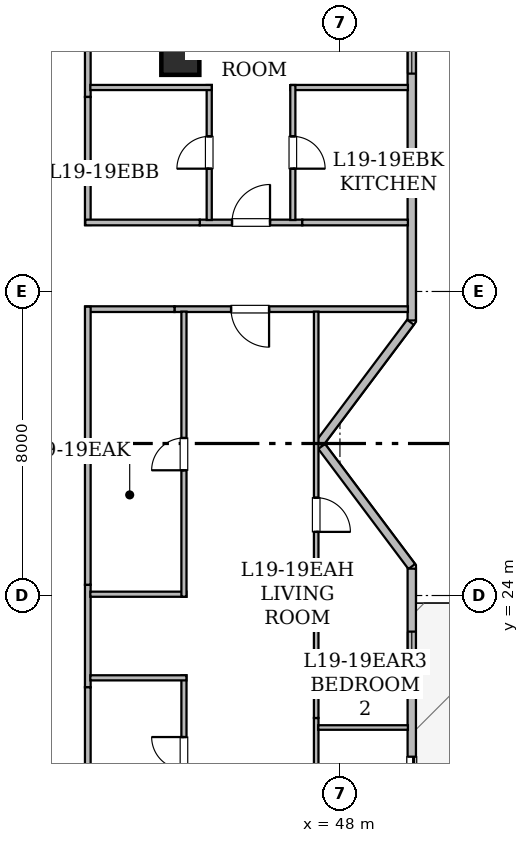
"""IFC4 building model, lengths in metres.
Left out: names, types, materials, properties, quantities, classifications, styles, units other than length and angle.
Written with IfcOpenShell. Run it as: python <this file> out.ifc"""

import sys

from ifc_helpers import new_model, si_unit, direction, frame, frame_2d, origin, origin_2d, place, context, subcontext, project, spatial, rectangle, hollow_rectangle, extrude, element, fill, save


model = new_model("IFC4")
c1 = context("Model", 3, precision=1e-05, world=origin(), true_north=direction((0.0, 1.0)))
c2 = subcontext(c1, "Body", "Model", "MODEL_VIEW")
j1 = project(units=[si_unit("LENGTHUNIT", "METRE"), si_unit("PLANEANGLEUNIT", "RADIAN")], contexts=[c1])
p1 = place(None, origin())
s1 = spatial("IfcSite", under=j1, at=p1, CompositionType="ELEMENT")
p2 = place(p1, origin())
s2 = spatial("IfcBuilding", under=s1, at=p2, CompositionType="ELEMENT")
p3 = place(p2, frame((0.0, 0.0, 77.1)))
s3 = spatial("IfcBuildingStorey", under=s2, at=p3, CompositionType="ELEMENT", Elevation=77.1)
p4 = place(p3, frame((43.8, 38.2, 0.0), z_axis=(0.0, 0.0, 1.0), x_axis=(1.0, 0.0, 0.0)))
e1 = element("IfcColumn", 1, at=p4, inside=s3, PredefinedType="COLUMN", context=c2, shape_type="SweptSolid", body=[
    extrude(hollow_rectangle(XDim=1.0, YDim=1.0, WallThickness=0.05, at=origin_2d()), origin(), (0.0, 0.0, 1.0), 3.65),
])
p5 = place(p3, frame((49.89, 48.683, 0.0), z_axis=(0.0, 0.0, 1.0), x_axis=(0.0, -1.0, 0.0)))
e2 = element("IfcWall", 2, at=p5, inside=s3, PredefinedType="STANDARD", context=c2, shape_type="SweptSolid", body=[
    extrude(rectangle(XDim=17.446, YDim=0.22, at=frame_2d((8.723, 0.0))), origin(), (0.0, 0.0, 1.0), 3.43),
])
p6 = place(p5, frame((9.301, 0.0, 0.85)))
e3 = element("IfcOpeningElement", 3, at=p6, cuts=e2, PredefinedType="OPENING", context=c2, shape_type="SweptSolid", body=[
    extrude(rectangle(XDim=1.65, YDim=1.55, at=frame_2d((0.825, 0.775))), frame((0.0, 0.12, 0.0), z_axis=(0.0, -1.0, 0.0), x_axis=(1.0, 0.0, 0.0)), (0.0, 0.0, 1.0), 0.24),
])
p7 = place(p5, frame((4.036, 0.0, 0.85)))
e4 = element("IfcOpeningElement", 4, at=p7, cuts=e2, PredefinedType="OPENING", context=c2, shape_type="SweptSolid", body=[
    extrude(rectangle(XDim=1.65, YDim=1.55, at=frame_2d((0.825, 0.775))), frame((0.0, 0.12, 0.0), z_axis=(0.0, -1.0, 0.0), x_axis=(1.0, 0.0, 0.0)), (0.0, 0.0, 1.0), 0.24),
])
p8 = place(p3, frame((49.856, 31.191, 0.0), z_axis=(0.0, 0.0, 1.0), x_axis=(-0.600137081448, -0.799897170561, 0.0)))
e5 = element("IfcWall", 5, at=p8, inside=s3, PredefinedType="STANDARD", context=c2, shape_type="SweptSolid", body=[
    extrude(rectangle(XDim=3.989, YDim=0.22, at=frame_2d((1.995, 0.0))), origin(), (0.0, 0.0, 1.0), 3.43),
])
p9 = place(p3, frame((47.519, 27.923, 0.0), z_axis=(0.0, 0.0, 1.0), x_axis=(0.600118645218, -0.799911002338, 0.0)))
e6 = element("IfcWall", 6, at=p9, inside=s3, PredefinedType="STANDARD", context=c2, shape_type="SweptSolid", body=[
    extrude(rectangle(XDim=3.951, YDim=0.22, at=frame_2d((1.975, 0.0))), origin(), (0.0, 0.0, 1.0), 3.43),
])
p10 = place(p3, frame((49.89, 24.707, 0.0), z_axis=(0.0, 0.0, 1.0), x_axis=(0.0, -1.0, 0.0)))
e7 = element("IfcWall", 7, at=p10, inside=s3, PredefinedType="STANDARD", context=c2, shape_type="SweptSolid", body=[
    extrude(rectangle(XDim=17.461, YDim=0.22, at=frame_2d((8.73, 0.0))), origin(), (0.0, 0.0, 1.0), 3.43),
])
p11 = place(p10, frame((4.948, 0.0, 0.0)))
e8 = element("IfcOpeningElement", 8, at=p11, cuts=e7, PredefinedType="OPENING", context=c2, shape_type="SweptSolid", body=[
    extrude(rectangle(XDim=1.1, YDim=2.2, at=frame_2d((0.55, 1.1))), frame((0.0, 0.12, 0.0), z_axis=(0.0, -1.0, 0.0), x_axis=(1.0, 0.0, 0.0)), (0.0, 0.0, 1.0), 0.24),
])
p12 = place(p10, frame((14.329, 0.0, 0.85)))
e9 = element("IfcOpeningElement", 9, at=p12, cuts=e7, PredefinedType="OPENING", context=c2, shape_type="SweptSolid", body=[
    extrude(rectangle(XDim=1.65, YDim=1.55, at=frame_2d((0.825, 0.775))), frame((0.0, 0.12, 0.0), z_axis=(0.0, -1.0, 0.0), x_axis=(1.0, 0.0, 0.0)), (0.0, 0.0, 1.0), 0.24),
])
p13 = place(p10, frame((1.657, 0.0, 0.85)))
e10 = element("IfcOpeningElement", 10, at=p13, cuts=e7, PredefinedType="OPENING", context=c2, shape_type="SweptSolid", body=[
    extrude(rectangle(XDim=1.65, YDim=1.55, at=frame_2d((0.825, 0.775))), frame((0.0, 0.12, 0.0), z_axis=(0.0, -1.0, 0.0), x_axis=(1.0, 0.0, 0.0)), (0.0, 0.0, 1.0), 0.24),
])
p14 = place(p3, frame((49.788, 31.535, 0.0), z_axis=(0.0, 0.0, 1.0), x_axis=(-1.0, 0.0, 0.0)))
e11 = element("IfcWall", 11, at=p14, inside=s3, PredefinedType="STANDARD", context=c2, shape_type="SweptSolid", body=[
    extrude(rectangle(XDim=6.142, YDim=0.15, at=frame_2d((3.071, 0.0))), origin(), (0.0, 0.0, 1.0), 2.647),
])
p15 = place(p14, frame((3.653, 0.0, 0.0)))
e12 = element("IfcOpeningElement", 12, at=p15, cuts=e11, PredefinedType="OPENING", context=c2, shape_type="SweptSolid", body=[
    extrude(rectangle(XDim=1.0, YDim=2.15, at=frame_2d((0.5, 1.075))), frame((0.0, 0.085, 0.0), z_axis=(0.0, -1.0, 0.0), x_axis=(1.0, 0.0, 0.0)), (0.0, 0.0, 1.0), 0.17),
])
p16 = place(p3, frame((41.365, 24.283, 0.0), z_axis=(0.0, 0.0, 1.0), x_axis=(0.0, -1.0, 0.0)))
e13 = element("IfcWall", 13, at=p16, inside=s3, PredefinedType="STANDARD", context=c2, shape_type="SweptSolid", body=[
    extrude(rectangle(XDim=2.698, YDim=0.15, at=frame_2d((1.349, 0.0))), origin(), (0.0, 0.0, 1.0), 3.43),
])
p17 = place(p3, frame((41.365, 21.585, 0.0), z_axis=(0.0, 0.0, 1.0), x_axis=(0.0, -1.0, 0.0)))
e14 = element("IfcWall", 14, at=p17, inside=s3, PredefinedType="STANDARD", context=c2, shape_type="SweptSolid", body=[
    extrude(rectangle(XDim=3.467, YDim=0.15, at=frame_2d((1.733, 0.0))), origin(), (0.0, 0.0, 1.0), 2.647),
])
p18 = place(p3, frame((43.646, 31.535, 0.0), z_axis=(0.0, 0.0, 1.0), x_axis=(-1.0, 0.0, 0.0)))
e15 = element("IfcWall", 15, at=p18, inside=s3, PredefinedType="STANDARD", context=c2, shape_type="SweptSolid", body=[
    extrude(rectangle(XDim=2.346, YDim=0.15, at=frame_2d((1.173, 0.0))), origin(), (0.0, 0.0, 1.0), 2.647),
])
p19 = place(p3, frame((41.365, 31.6, 0.0), z_axis=(0.0, 0.0, 1.0), x_axis=(0.0, -1.0, 0.0)))
e16 = element("IfcWall", 16, at=p19, inside=s3, PredefinedType="STANDARD", context=c2, shape_type="SweptSolid", body=[
    extrude(rectangle(XDim=7.317, YDim=0.15, at=frame_2d((3.659, 0.0))), origin(), (0.0, 0.0, 1.0), 2.961),
])
p20 = place(p3, frame((41.365, 39.1, 0.0), z_axis=(0.0, 0.0, 1.0), x_axis=(0.0, -1.0, 0.0)))
e17 = element("IfcWall", 17, at=p20, inside=s3, PredefinedType="STANDARD", context=c2, shape_type="SweptSolid", body=[
    extrude(rectangle(XDim=1.982, YDim=0.15, at=frame_2d((0.991, 0.0))), origin(), (0.0, 0.0, 1.0), 2.647),
])
p21 = place(p3, frame((44.311, 33.815, 0.0), z_axis=(0.0, 0.0, 1.0), x_axis=(1.0, 0.0, 0.0)))
e18 = element("IfcWall", 18, at=p21, inside=s3, PredefinedType="STANDARD", context=c2, shape_type="SweptSolid", body=[
    extrude(rectangle(XDim=2.698, YDim=0.15, at=frame_2d((1.349, 0.0))), origin(), (0.0, 0.0, 1.0), 3.43),
])
p22 = place(p21, frame((0.849, 0.0, 0.0)))
e19 = element("IfcOpeningElement", 19, at=p22, cuts=e18, PredefinedType="OPENING", context=c2, shape_type="SweptSolid", body=[
    extrude(rectangle(XDim=1.0, YDim=2.15, at=frame_2d((0.5, 1.075))), frame((0.0, 0.085, 0.0), z_axis=(0.0, -1.0, 0.0), x_axis=(1.0, 0.0, 0.0)), (0.0, 0.0, 1.0), 0.17),
])
p23 = place(p3, frame((41.365, 37.118, 0.0), z_axis=(0.0, 0.0, 1.0), x_axis=(0.0, -1.0, 0.0)))
e20 = element("IfcWall", 20, at=p23, inside=s3, PredefinedType="STANDARD", context=c2, shape_type="SweptSolid", body=[
    extrude(rectangle(XDim=3.368, YDim=0.15, at=frame_2d((1.684, 0.0))), origin(), (0.0, 0.0, 1.0), 3.43),
])
p24 = place(p3, frame((41.3, 33.815, 0.0), z_axis=(0.0, 0.0, 1.0), x_axis=(1.0, 0.0, 0.0)))
e21 = element("IfcWall", 21, at=p24, inside=s3, PredefinedType="STANDARD", context=c2, shape_type="SweptSolid", body=[
    extrude(rectangle(XDim=3.011, YDim=0.15, at=frame_2d((1.505, 0.0))), origin(), (0.0, 0.0, 1.0), 2.647),
])
p25 = place(p3, frame((47.009, 33.815, 0.0), z_axis=(0.0, 0.0, 1.0), x_axis=(1.0, 0.0, 0.0)))
e22 = element("IfcWall", 22, at=p25, inside=s3, PredefinedType="STANDARD", context=c2, shape_type="SweptSolid", body=[
    extrude(rectangle(XDim=2.779, YDim=0.15, at=frame_2d((1.39, 0.0))), origin(), (0.0, 0.0, 1.0), 2.803),
])
p26 = place(p3, frame((43.895, 17.804, 0.0), z_axis=(0.0, 0.0, 1.0), x_axis=(0.0, 1.0, 0.0)))
e23 = element("IfcWall", 23, at=p26, inside=s3, PredefinedType="PARTITIONING", context=c2, shape_type="SweptSolid", body=[
    extrude(rectangle(XDim=4.095, YDim=0.135, at=frame_2d((2.047, 0.0))), origin(), (0.0, 0.0, 1.0), 2.647),
])
p27 = place(p26, frame((1.622, 0.0, 0.0)))
e24 = element("IfcOpeningElement", 24, at=p27, cuts=e23, PredefinedType="OPENING", context=c2, shape_type="SweptSolid", body=[
    extrude(rectangle(XDim=0.85, YDim=2.1, at=frame_2d((0.425, 1.05))), frame((0.0, 0.077, 0.0), z_axis=(0.0, -1.0, 0.0), x_axis=(1.0, 0.0, 0.0)), (0.0, 0.0, 1.0), 0.155),
])
for number, where, z_axis, x_axis in (
    (25, (43.96, 21.834, 0.0), (0.0, 0.0, 1.0), (-1.0, 0.0, 0.0)),
    (26, (41.432, 24.034, 0.0), (0.0, 0.0, 1.0), (1.0, 0.0, 0.0)),
):
    element("IfcWall", number, at=place(p3, frame(where, z_axis=z_axis, x_axis=x_axis)), inside=s3, PredefinedType="PARTITIONING", context=c2, shape_type="SweptSolid", body=[
        extrude(rectangle(XDim=2.528, YDim=0.135, at=frame_2d((1.264, 0.0))), origin(), (0.0, 0.0, 1.0), 2.647),
    ])
p28 = place(p3, frame((43.895, 23.969, 0.0), z_axis=(0.0, 0.0, 1.0), x_axis=(0.0, 1.0, 0.0)))
e27 = element("IfcWall", 27, at=p28, inside=s3, PredefinedType="PARTITIONING", context=c2, shape_type="SweptSolid", body=[
    extrude(rectangle(XDim=7.501, YDim=0.135, at=frame_2d((3.75, 0.0))), origin(), (0.0, 0.0, 1.0), 2.647),
])
p29 = place(p28, frame((3.326, 0.0, 0.0)))
e28 = element("IfcOpeningElement", 28, at=p29, cuts=e27, PredefinedType="OPENING", context=c2, shape_type="SweptSolid", body=[
    extrude(rectangle(XDim=0.85, YDim=2.1, at=frame_2d((0.425, 1.05))), frame((0.0, 0.077, 0.0), z_axis=(0.0, -1.0, 0.0), x_axis=(1.0, 0.0, 0.0)), (0.0, 0.0, 1.0), 0.155),
])
p30 = place(p3, frame((47.375, 20.777, 0.0), z_axis=(0.0, 0.0, 1.0), x_axis=(0.0, -1.0, 0.0)))
e29 = element("IfcWall", 29, at=p30, inside=s3, PredefinedType="PARTITIONING", context=c2, shape_type="SweptSolid", body=[
    extrude(rectangle(XDim=6.615, YDim=0.12, at=frame_2d((3.308, 0.0))), origin(), (0.0, 0.0, 1.0), 2.647),
])
p31 = place(p30, frame((2.453, 0.0, 0.0)))
e30 = element("IfcOpeningElement", 30, at=p31, cuts=e29, PredefinedType="OPENING", context=c2, shape_type="SweptSolid", body=[
    extrude(rectangle(XDim=0.9, YDim=2.1, at=frame_2d((0.45, 1.05))), frame((0.0, 0.07, 0.0), z_axis=(0.0, -1.0, 0.0), x_axis=(1.0, 0.0, 0.0)), (0.0, 0.0, 1.0), 0.14),
])
p32 = place(p3, frame((47.375, 31.47, 0.0), z_axis=(0.0, 0.0, 1.0), x_axis=(0.0, -1.0, 0.0)))
e31 = element("IfcWall", 31, at=p32, inside=s3, PredefinedType="PARTITIONING", context=c2, shape_type="SweptSolid", body=[
    extrude(rectangle(XDim=10.693, YDim=0.12, at=frame_2d((5.346, 0.0))), origin(), (0.0, 0.0, 1.0), 2.961),
])
p33 = place(p32, frame((4.896, 0.0, 0.0)))
e32 = element("IfcOpeningElement", 32, at=p33, cuts=e31, PredefinedType="OPENING", context=c2, shape_type="SweptSolid", body=[
    extrude(rectangle(XDim=0.9, YDim=2.1, at=frame_2d((0.45, 1.05))), frame((0.0, 0.07, 0.0), z_axis=(0.0, -1.0, 0.0), x_axis=(1.0, 0.0, 0.0)), (0.0, 0.0, 1.0), 0.14),
])
p34 = place(p3, frame((47.429, 20.527, 0.0), z_axis=(0.0, 0.0, 1.0), x_axis=(1.0, 0.0, 0.0)))
e33 = element("IfcWall", 33, at=p34, inside=s3, PredefinedType="PARTITIONING", context=c2, shape_type="SweptSolid", body=[
    extrude(rectangle(XDim=2.359, YDim=0.12, at=frame_2d((1.18, 0.0))), origin(), (0.0, 0.0, 1.0), 2.803),
])
p35 = place(p3, frame((44.56, 33.88, 0.0), z_axis=(0.0, 0.0, 1.0), x_axis=(0.0, 1.0, 0.0)))
e34 = element("IfcWall", 34, at=p35, inside=s3, PredefinedType="PARTITIONING", context=c2, shape_type="SweptSolid", body=[
    extrude(rectangle(XDim=3.552, YDim=0.135, at=frame_2d((1.776, 0.0))), origin(), (0.0, 0.0, 1.0), 3.43),
])
p36 = place(p35, frame((1.351, 0.0, 0.0)))
e35 = element("IfcOpeningElement", 35, at=p36, cuts=e34, PredefinedType="OPENING", context=c2, shape_type="SweptSolid", body=[
    extrude(rectangle(XDim=0.85, YDim=2.1, at=frame_2d((0.425, 1.05))), frame((0.0, 0.077, 0.0), z_axis=(0.0, -1.0, 0.0), x_axis=(1.0, 0.0, 0.0)), (0.0, 0.0, 1.0), 0.155),
])
p37 = place(p3, frame((44.625, 37.367, 0.0), z_axis=(0.0, 0.0, 1.0), x_axis=(-1.0, 0.0, 0.0)))
e36 = element("IfcWall", 36, at=p37, inside=s3, PredefinedType="PARTITIONING", context=c2, shape_type="SweptSolid", body=[
    extrude(rectangle(XDim=3.193, YDim=0.135, at=frame_2d((1.597, 0.0))), origin(), (0.0, 0.0, 1.0), 2.647),
])
p38 = place(p3, frame((49.788, 37.367, 0.0), z_axis=(0.0, 0.0, 1.0), x_axis=(-1.0, 0.0, 0.0)))
e37 = element("IfcWall", 37, at=p38, inside=s3, PredefinedType="PARTITIONING", context=c2, shape_type="SweptSolid", body=[
    extrude(rectangle(XDim=3.093, YDim=0.135, at=frame_2d((1.546, 0.0))), origin(), (0.0, 0.0, 1.0), 2.803),
])
p39 = place(p3, frame((46.76, 37.432, 0.0), z_axis=(0.0, 0.0, 1.0), x_axis=(0.0, -1.0, 0.0)))
e38 = element("IfcWall", 38, at=p39, inside=s3, PredefinedType="PARTITIONING", context=c2, shape_type="SweptSolid", body=[
    extrude(rectangle(XDim=3.552, YDim=0.135, at=frame_2d((1.776, 0.0))), origin(), (0.0, 0.0, 1.0), 3.43),
])
p40 = place(p39, frame((1.351, 0.0, 0.0)))
e39 = element("IfcOpeningElement", 39, at=p40, cuts=e38, PredefinedType="OPENING", context=c2, shape_type="SweptSolid", body=[
    extrude(rectangle(XDim=0.85, YDim=2.1, at=frame_2d((0.425, 1.05))), frame((0.0, 0.077, 0.0), z_axis=(0.0, -1.0, 0.0), x_axis=(1.0, 0.0, 0.0)), (0.0, 0.0, 1.0), 0.155),
])
p41 = place(p11, origin())
e40 = element("IfcDoor", 40, at=p41, inside=s3, OperationType="SLIDING_TO_LEFT", PredefinedType="DOOR", context=c2, shape_type="SweptSolid", body=[
    extrude(rectangle(XDim=1.1, YDim=2.2, at=frame_2d((0.55, 1.1))), frame((0.0, 0.025, 0.0), z_axis=(0.0, -1.0, 0.0), x_axis=(1.0, 0.0, 0.0)), (0.0, 0.0, 1.0), 0.05),
])
fill(e8, e40)
p42 = place(p13, origin())
e41 = element("IfcWindow", 41, at=p42, inside=s3, PartitioningType="SINGLE_PANEL", PredefinedType="WINDOW", context=c2, shape_type="SweptSolid", body=[
    extrude(rectangle(XDim=1.65, YDim=1.55, at=frame_2d((0.825, 0.775))), frame((0.0, 0.03, 0.0), z_axis=(0.0, -1.0, 0.0), x_axis=(1.0, 0.0, 0.0)), (0.0, 0.0, 1.0), 0.06),
])
fill(e10, e41)
p43 = place(p6, origin())
e42 = element("IfcWindow", 42, at=p43, inside=s3, PartitioningType="SINGLE_PANEL", PredefinedType="WINDOW", context=c2, shape_type="SweptSolid", body=[
    extrude(rectangle(XDim=1.65, YDim=1.55, at=frame_2d((0.825, 0.775))), frame((0.0, 0.03, 0.0), z_axis=(0.0, -1.0, 0.0), x_axis=(1.0, 0.0, 0.0)), (0.0, 0.0, 1.0), 0.06),
])
fill(e3, e42)
p44 = place(p15, origin())
e43 = element("IfcDoor", 43, at=p44, inside=s3, OperationType="SINGLE_SWING_LEFT", PredefinedType="DOOR", context=c2, shape_type="SweptSolid", body=[
    extrude(rectangle(XDim=1.0, YDim=2.15, at=frame_2d((0.5, 1.075))), frame((0.0, 0.025, 0.0), z_axis=(0.0, -1.0, 0.0), x_axis=(1.0, 0.0, 0.0)), (0.0, 0.0, 1.0), 0.05),
])
fill(e12, e43)
p45 = place(p22, origin())
e44 = element("IfcDoor", 44, at=p45, inside=s3, OperationType="SINGLE_SWING_RIGHT", PredefinedType="DOOR", context=c2, shape_type="SweptSolid", body=[
    extrude(rectangle(XDim=1.0, YDim=2.15, at=frame_2d((0.5, 1.075))), frame((0.0, 0.025, 0.0), z_axis=(0.0, -1.0, 0.0), x_axis=(1.0, 0.0, 0.0)), (0.0, 0.0, 1.0), 0.05),
])
fill(e19, e44)
p46 = place(p27, origin())
e45 = element("IfcDoor", 45, at=p46, inside=s3, OperationType="SINGLE_SWING_RIGHT", PredefinedType="DOOR", context=c2, shape_type="SweptSolid", body=[
    extrude(rectangle(XDim=0.85, YDim=2.1, at=frame_2d((0.425, 1.05))), frame((0.0, 0.025, 0.0), z_axis=(0.0, -1.0, 0.0), x_axis=(1.0, 0.0, 0.0)), (0.0, 0.0, 1.0), 0.05),
])
fill(e24, e45)
p47 = place(p29, origin())
e46 = element("IfcDoor", 46, at=p47, inside=s3, OperationType="SINGLE_SWING_LEFT", PredefinedType="DOOR", context=c2, shape_type="SweptSolid", body=[
    extrude(rectangle(XDim=0.85, YDim=2.1, at=frame_2d((0.425, 1.05))), frame((0.0, 0.025, 0.0), z_axis=(0.0, -1.0, 0.0), x_axis=(1.0, 0.0, 0.0)), (0.0, 0.0, 1.0), 0.05),
])
fill(e28, e46)
p48 = place(p33, origin())
e47 = element("IfcDoor", 47, at=p48, inside=s3, OperationType="SINGLE_SWING_RIGHT", PredefinedType="DOOR", context=c2, shape_type="SweptSolid", body=[
    extrude(rectangle(XDim=0.9, YDim=2.1, at=frame_2d((0.45, 1.05))), frame((0.0, 0.025, 0.0), z_axis=(0.0, -1.0, 0.0), x_axis=(1.0, 0.0, 0.0)), (0.0, 0.0, 1.0), 0.05),
])
fill(e32, e47)
p49 = place(p36, origin())
e48 = element("IfcDoor", 48, at=p49, inside=s3, OperationType="SINGLE_SWING_LEFT", PredefinedType="DOOR", context=c2, shape_type="SweptSolid", body=[
    extrude(rectangle(XDim=0.85, YDim=2.1, at=frame_2d((0.425, 1.05))), frame((0.0, 0.025, 0.0), z_axis=(0.0, -1.0, 0.0), x_axis=(1.0, 0.0, 0.0)), (0.0, 0.0, 1.0), 0.05),
])
fill(e35, e48)
p50 = place(p40, origin())
e49 = element("IfcDoor", 49, at=p50, inside=s3, OperationType="SINGLE_SWING_RIGHT", PredefinedType="DOOR", context=c2, shape_type="SweptSolid", body=[
    extrude(rectangle(XDim=0.85, YDim=2.1, at=frame_2d((0.425, 1.05))), frame((0.0, 0.025, 0.0), z_axis=(0.0, -1.0, 0.0), x_axis=(1.0, 0.0, 0.0)), (0.0, 0.0, 1.0), 0.05),
])
fill(e39, e49)
save(model, sys.argv[1])
